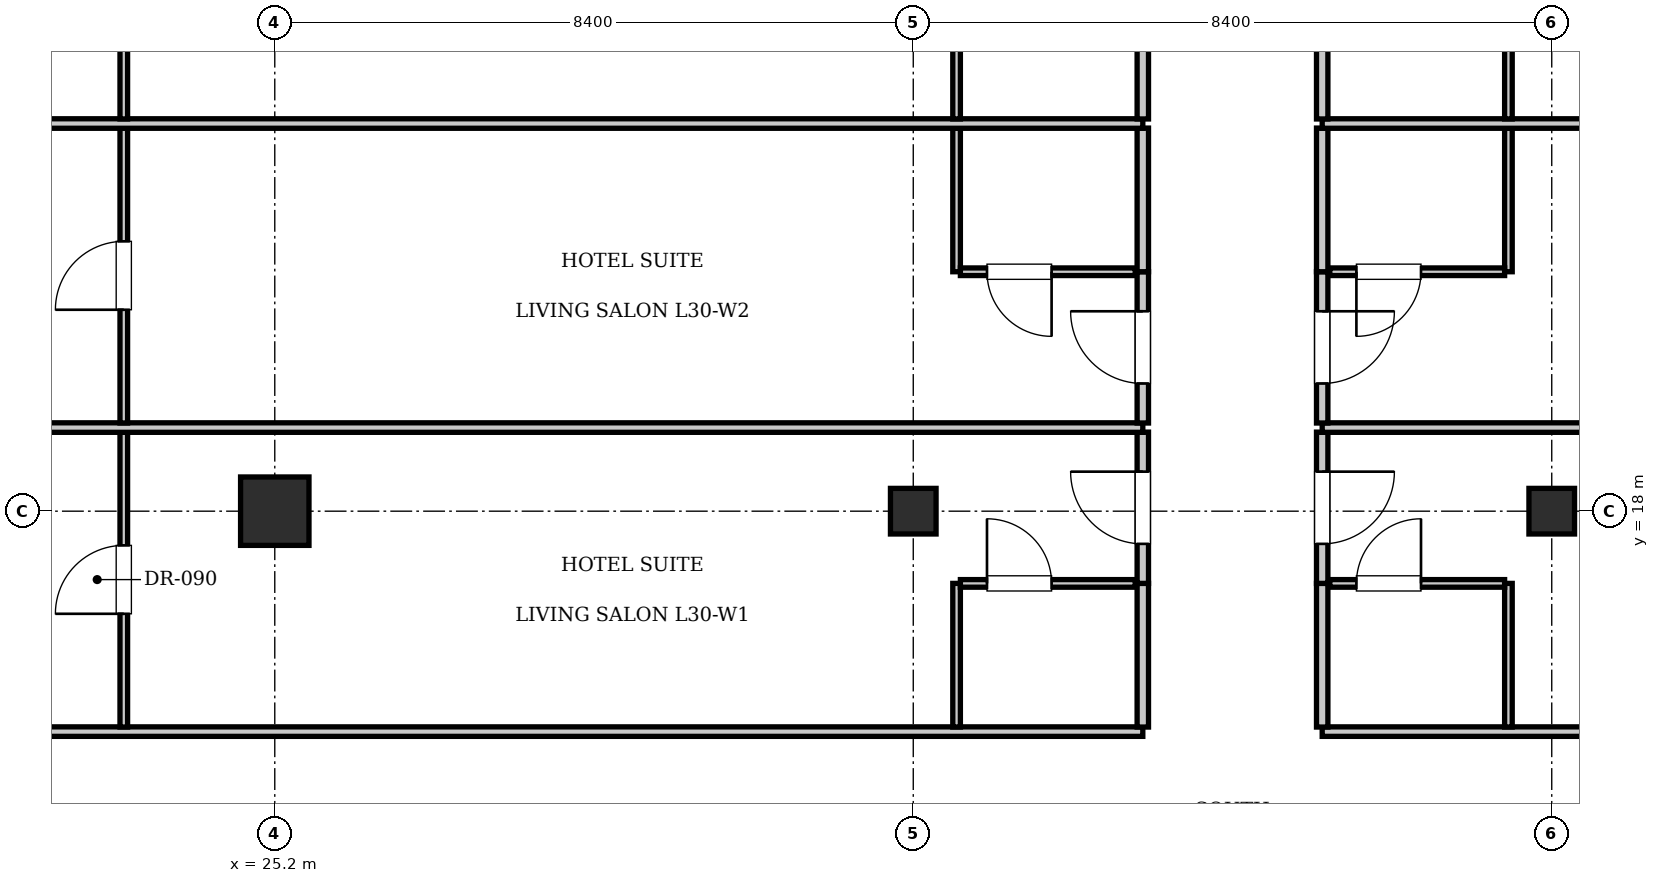
"""IFC4 building model, lengths in metres.
Left out: names, types, materials, properties, quantities, classifications, styles, units other than length and angle.
Written with IfcOpenShell. Run it as: python <this file> out.ifc"""

import sys

from ifc_helpers import new_model, si_unit, direction, frame, frame_2d, origin, origin_2d, place, context, subcontext, project, spatial, rectangle, i_section, extrude, element, fill, save


model = new_model("IFC4")
c1 = context("Model", 3, precision=1e-05, world=origin(), true_north=direction((0.0, 1.0)))
c2 = subcontext(c1, "Body", "Model", "MODEL_VIEW")
j1 = project(units=[si_unit("LENGTHUNIT", "METRE"), si_unit("PLANEANGLEUNIT", "RADIAN")], contexts=[c1])
p1 = place(None, origin())
s1 = spatial("IfcSite", under=j1, at=p1, CompositionType="ELEMENT")
p2 = place(p1, origin())
s2 = spatial("IfcBuilding", under=s1, at=p2, CompositionType="ELEMENT")
p3 = place(p2, frame((0.0, 0.0, 127.4)))
s3 = spatial("IfcBuildingStorey", under=s2, at=p3, CompositionType="ELEMENT", Elevation=127.4)
p4 = place(p3, frame((25.2, 18.0, 0.0), z_axis=(0.0, 0.0, 1.0), x_axis=(1.0, 0.0, 0.0)))
e1 = element("IfcColumn", 1, at=p4, inside=s3, PredefinedType="COLUMN", context=c2, shape_type="SweptSolid", body=[
    extrude(rectangle(XDim=0.9, YDim=0.9, at=origin_2d()), origin(), (0.0, 0.0, 1.0), 3.85),
])
for number, where, z_axis, x_axis in (
    (2, (33.6, 18.0, 0.0), (0.0, 0.0, 1.0), (1.0, 0.0, 0.0)),
    (3, (42.0, 18.0, 0.0), (0.0, 0.0, 1.0), (1.0, 0.0, 0.0)),
):
    element("IfcColumn", number, at=place(p3, frame(where, z_axis=z_axis, x_axis=x_axis)), inside=s3, PredefinedType="COLUMN", context=c2, shape_type="SweptSolid", body=[
        extrude(i_section(OverallWidth=0.6, OverallDepth=0.6, WebThickness=0.025, FlangeThickness=0.038, at=origin_2d()), origin(), (0.0, 0.0, 1.0), 3.85),
    ])
p5 = place(p3, frame((13.2, 15.1, 0.0), z_axis=(0.0, 0.0, 1.0), x_axis=(1.0, 0.0, 0.0)))
e4 = element("IfcWall", 4, at=p5, inside=s3, PredefinedType="PARTITIONING", context=c2, shape_type="SweptSolid", body=[
    extrude(rectangle(XDim=23.42, YDim=0.125, at=frame_2d((11.71, 0.0))), origin(), (0.0, 0.0, 1.0), 3.61),
])
p6 = place(p3, frame((38.98, 15.1, 0.0), z_axis=(0.0, 0.0, 1.0), x_axis=(1.0, 0.0, 0.0)))
e5 = element("IfcWall", 5, at=p6, inside=s3, PredefinedType="PARTITIONING", context=c2, shape_type="SweptSolid", body=[
    extrude(rectangle(XDim=23.42, YDim=0.125, at=frame_2d((11.71, 0.0))), origin(), (0.0, 0.0, 1.0), 3.61),
])
p7 = place(p3, frame((36.62, 15.16, 0.0), z_axis=(0.0, 0.0, 1.0), x_axis=(0.0, 1.0, 0.0)))
e6 = element("IfcWall", 6, at=p7, inside=s3, PredefinedType="PARTITIONING", context=c2, shape_type="SweptSolid", body=[
    extrude(rectangle(XDim=1.89, YDim=0.15, at=frame_2d((0.945, 0.0))), origin(), (0.0, 0.0, 1.0), 3.61),
])
p8 = place(p3, frame((36.62, 17.05, 0.0), z_axis=(0.0, 0.0, 1.0), x_axis=(0.0, 1.0, 0.0)))
e7 = element("IfcWall", 7, at=p8, inside=s3, PredefinedType="PARTITIONING", context=c2, shape_type="SweptSolid", body=[
    extrude(rectangle(XDim=1.99, YDim=0.15, at=frame_2d((0.995, 0.0))), origin(), (0.0, 0.0, 1.0), 3.61),
])
p9 = place(p8, frame((0.52, 0.0, 0.0)))
e8 = element("IfcOpeningElement", 8, at=p9, cuts=e7, PredefinedType="OPENING", context=c2, shape_type="SweptSolid", body=[
    extrude(rectangle(XDim=0.95, YDim=2.15, at=frame_2d((0.475, 1.075))), frame((0.0, 0.085, 0.0), z_axis=(0.0, -1.0, 0.0), x_axis=(1.0, 0.0, 0.0)), (0.0, 0.0, 1.0), 0.17),
])
p10 = place(p3, frame((34.17, 15.16, 0.0), z_axis=(0.0, 0.0, 1.0), x_axis=(0.0, 1.0, 0.0)))
e9 = element("IfcWall", 9, at=p10, inside=s3, PredefinedType="PARTITIONING", context=c2, shape_type="SweptSolid", body=[
    extrude(rectangle(XDim=1.89, YDim=0.1, at=frame_2d((0.945, 0.0))), origin(), (0.0, 0.0, 1.0), 3.61),
])
p11 = place(p3, frame((34.22, 17.05, 0.0), z_axis=(0.0, 0.0, 1.0), x_axis=(1.0, 0.0, 0.0)))
e10 = element("IfcWall", 10, at=p11, inside=s3, PredefinedType="PARTITIONING", context=c2, shape_type="SweptSolid", body=[
    extrude(rectangle(XDim=2.3, YDim=0.1, at=frame_2d((1.15, 0.0))), origin(), (0.0, 0.0, 1.0), 3.61),
])
p12 = place(p11, frame((0.35, 0.0, 0.0)))
e11 = element("IfcOpeningElement", 11, at=p12, cuts=e10, PredefinedType="OPENING", context=c2, shape_type="SweptSolid", body=[
    extrude(rectangle(XDim=0.85, YDim=2.1, at=frame_2d((0.425, 1.05))), frame((0.0, 0.06, 0.0), z_axis=(0.0, -1.0, 0.0), x_axis=(1.0, 0.0, 0.0)), (0.0, 0.0, 1.0), 0.12),
])
p13 = place(p3, frame((23.214, 15.16, 0.0), z_axis=(0.0, 0.0, 1.0), x_axis=(0.0, 1.0, 0.0)))
e12 = element("IfcWall", 12, at=p13, inside=s3, PredefinedType="PARTITIONING", context=c2, shape_type="SweptSolid", body=[
    extrude(rectangle(XDim=3.88, YDim=0.1, at=frame_2d((1.94, 0.0))), origin(), (0.0, 0.0, 1.0), 3.61),
])
p14 = place(p13, frame((1.49, 0.0, 0.0)))
e13 = element("IfcOpeningElement", 13, at=p14, cuts=e12, PredefinedType="OPENING", context=c2, shape_type="SweptSolid", body=[
    extrude(rectangle(XDim=0.9, YDim=2.1, at=frame_2d((0.45, 1.05))), frame((0.0, 0.06, 0.0), z_axis=(0.0, -1.0, 0.0), x_axis=(1.0, 0.0, 0.0)), (0.0, 0.0, 1.0), 0.12),
])
p15 = place(p3, frame((38.98, 15.16, 0.0), z_axis=(0.0, 0.0, 1.0), x_axis=(0.0, 1.0, 0.0)))
e14 = element("IfcWall", 14, at=p15, inside=s3, PredefinedType="PARTITIONING", context=c2, shape_type="SweptSolid", body=[
    extrude(rectangle(XDim=1.89, YDim=0.15, at=frame_2d((0.945, 0.0))), origin(), (0.0, 0.0, 1.0), 3.61),
])
p16 = place(p3, frame((38.98, 17.05, 0.0), z_axis=(0.0, 0.0, 1.0), x_axis=(0.0, 1.0, 0.0)))
e15 = element("IfcWall", 15, at=p16, inside=s3, PredefinedType="PARTITIONING", context=c2, shape_type="SweptSolid", body=[
    extrude(rectangle(XDim=1.99, YDim=0.15, at=frame_2d((0.995, 0.0))), origin(), (0.0, 0.0, 1.0), 3.61),
])
p17 = place(p16, frame((0.52, 0.0, 0.0)))
e16 = element("IfcOpeningElement", 16, at=p17, cuts=e15, PredefinedType="OPENING", context=c2, shape_type="SweptSolid", body=[
    extrude(rectangle(XDim=0.95, YDim=2.15, at=frame_2d((0.475, 1.075))), frame((0.0, 0.085, 0.0), z_axis=(0.0, -1.0, 0.0), x_axis=(1.0, 0.0, 0.0)), (0.0, 0.0, 1.0), 0.17),
])
p18 = place(p3, frame((41.43, 15.16, 0.0), z_axis=(0.0, 0.0, 1.0), x_axis=(0.0, 1.0, 0.0)))
e17 = element("IfcWall", 17, at=p18, inside=s3, PredefinedType="PARTITIONING", context=c2, shape_type="SweptSolid", body=[
    extrude(rectangle(XDim=1.89, YDim=0.1, at=frame_2d((0.945, 0.0))), origin(), (0.0, 0.0, 1.0), 3.61),
])
p19 = place(p3, frame((39.08, 17.05, 0.0), z_axis=(0.0, 0.0, 1.0), x_axis=(1.0, 0.0, 0.0)))
e18 = element("IfcWall", 18, at=p19, inside=s3, PredefinedType="PARTITIONING", context=c2, shape_type="SweptSolid", body=[
    extrude(rectangle(XDim=2.3, YDim=0.1, at=frame_2d((1.15, 0.0))), origin(), (0.0, 0.0, 1.0), 3.61),
])
p20 = place(p19, frame((0.35, 0.0, 0.0)))
e19 = element("IfcOpeningElement", 19, at=p20, cuts=e18, PredefinedType="OPENING", context=c2, shape_type="SweptSolid", body=[
    extrude(rectangle(XDim=0.85, YDim=2.1, at=frame_2d((0.425, 1.05))), frame((0.0, 0.06, 0.0), z_axis=(0.0, -1.0, 0.0), x_axis=(1.0, 0.0, 0.0)), (0.0, 0.0, 1.0), 0.12),
])
p21 = place(p3, frame((13.2, 19.1, 0.0), z_axis=(0.0, 0.0, 1.0), x_axis=(1.0, 0.0, 0.0)))
e20 = element("IfcWall", 20, at=p21, inside=s3, PredefinedType="PARTITIONING", context=c2, shape_type="SweptSolid", body=[
    extrude(rectangle(XDim=23.42, YDim=0.125, at=frame_2d((11.71, 0.0))), origin(), (0.0, 0.0, 1.0), 3.61),
])
p22 = place(p3, frame((38.98, 19.1, 0.0), z_axis=(0.0, 0.0, 1.0), x_axis=(1.0, 0.0, 0.0)))
e21 = element("IfcWall", 21, at=p22, inside=s3, PredefinedType="PARTITIONING", context=c2, shape_type="SweptSolid", body=[
    extrude(rectangle(XDim=23.42, YDim=0.125, at=frame_2d((11.71, 0.0))), origin(), (0.0, 0.0, 1.0), 3.61),
])
p23 = place(p3, frame((36.62, 19.16, 0.0), z_axis=(0.0, 0.0, 1.0), x_axis=(0.0, 1.0, 0.0)))
e22 = element("IfcWall", 22, at=p23, inside=s3, PredefinedType="PARTITIONING", context=c2, shape_type="SweptSolid", body=[
    extrude(rectangle(XDim=1.99, YDim=0.15, at=frame_2d((0.995, 0.0))), origin(), (0.0, 0.0, 1.0), 3.61),
])
p24 = place(p23, frame((0.52, 0.0, 0.0)))
e23 = element("IfcOpeningElement", 23, at=p24, cuts=e22, PredefinedType="OPENING", context=c2, shape_type="SweptSolid", body=[
    extrude(rectangle(XDim=0.95, YDim=2.15, at=frame_2d((0.475, 1.075))), frame((0.0, 0.085, 0.0), z_axis=(0.0, -1.0, 0.0), x_axis=(1.0, 0.0, 0.0)), (0.0, 0.0, 1.0), 0.17),
])
p25 = place(p3, frame((36.62, 21.15, 0.0), z_axis=(0.0, 0.0, 1.0), x_axis=(0.0, 1.0, 0.0)))
e24 = element("IfcWall", 24, at=p25, inside=s3, PredefinedType="PARTITIONING", context=c2, shape_type="SweptSolid", body=[
    extrude(rectangle(XDim=1.89, YDim=0.15, at=frame_2d((0.945, 0.0))), origin(), (0.0, 0.0, 1.0), 3.61),
])
p26 = place(p3, frame((34.17, 21.15, 0.0), z_axis=(0.0, 0.0, 1.0), x_axis=(0.0, 1.0, 0.0)))
e25 = element("IfcWall", 25, at=p26, inside=s3, PredefinedType="PARTITIONING", context=c2, shape_type="SweptSolid", body=[
    extrude(rectangle(XDim=1.89, YDim=0.1, at=frame_2d((0.945, 0.0))), origin(), (0.0, 0.0, 1.0), 3.61),
])
p27 = place(p3, frame((34.22, 21.15, 0.0), z_axis=(0.0, 0.0, 1.0), x_axis=(1.0, 0.0, 0.0)))
e26 = element("IfcWall", 26, at=p27, inside=s3, PredefinedType="PARTITIONING", context=c2, shape_type="SweptSolid", body=[
    extrude(rectangle(XDim=2.3, YDim=0.1, at=frame_2d((1.15, 0.0))), origin(), (0.0, 0.0, 1.0), 3.61),
])
p28 = place(p27, frame((0.35, 0.0, 0.0)))
e27 = element("IfcOpeningElement", 27, at=p28, cuts=e26, PredefinedType="OPENING", context=c2, shape_type="SweptSolid", body=[
    extrude(rectangle(XDim=0.85, YDim=2.1, at=frame_2d((0.425, 1.05))), frame((0.0, 0.06, 0.0), z_axis=(0.0, -1.0, 0.0), x_axis=(1.0, 0.0, 0.0)), (0.0, 0.0, 1.0), 0.12),
])
p29 = place(p3, frame((23.214, 19.16, 0.0), z_axis=(0.0, 0.0, 1.0), x_axis=(0.0, 1.0, 0.0)))
e28 = element("IfcWall", 28, at=p29, inside=s3, PredefinedType="PARTITIONING", context=c2, shape_type="SweptSolid", body=[
    extrude(rectangle(XDim=3.88, YDim=0.1, at=frame_2d((1.94, 0.0))), origin(), (0.0, 0.0, 1.0), 3.61),
])
p30 = place(p29, frame((1.49, 0.0, 0.0)))
e29 = element("IfcOpeningElement", 29, at=p30, cuts=e28, PredefinedType="OPENING", context=c2, shape_type="SweptSolid", body=[
    extrude(rectangle(XDim=0.9, YDim=2.1, at=frame_2d((0.45, 1.05))), frame((0.0, 0.06, 0.0), z_axis=(0.0, -1.0, 0.0), x_axis=(1.0, 0.0, 0.0)), (0.0, 0.0, 1.0), 0.12),
])
p31 = place(p3, frame((38.98, 19.16, 0.0), z_axis=(0.0, 0.0, 1.0), x_axis=(0.0, 1.0, 0.0)))
e30 = element("IfcWall", 30, at=p31, inside=s3, PredefinedType="PARTITIONING", context=c2, shape_type="SweptSolid", body=[
    extrude(rectangle(XDim=1.99, YDim=0.15, at=frame_2d((0.995, 0.0))), origin(), (0.0, 0.0, 1.0), 3.61),
])
p32 = place(p31, frame((0.52, 0.0, 0.0)))
e31 = element("IfcOpeningElement", 31, at=p32, cuts=e30, PredefinedType="OPENING", context=c2, shape_type="SweptSolid", body=[
    extrude(rectangle(XDim=0.95, YDim=2.15, at=frame_2d((0.475, 1.075))), frame((0.0, 0.085, 0.0), z_axis=(0.0, -1.0, 0.0), x_axis=(1.0, 0.0, 0.0)), (0.0, 0.0, 1.0), 0.17),
])
p33 = place(p3, frame((38.98, 21.15, 0.0), z_axis=(0.0, 0.0, 1.0), x_axis=(0.0, 1.0, 0.0)))
e32 = element("IfcWall", 32, at=p33, inside=s3, PredefinedType="PARTITIONING", context=c2, shape_type="SweptSolid", body=[
    extrude(rectangle(XDim=1.89, YDim=0.15, at=frame_2d((0.945, 0.0))), origin(), (0.0, 0.0, 1.0), 3.61),
])
p34 = place(p3, frame((41.43, 21.15, 0.0), z_axis=(0.0, 0.0, 1.0), x_axis=(0.0, 1.0, 0.0)))
e33 = element("IfcWall", 33, at=p34, inside=s3, PredefinedType="PARTITIONING", context=c2, shape_type="SweptSolid", body=[
    extrude(rectangle(XDim=1.89, YDim=0.1, at=frame_2d((0.945, 0.0))), origin(), (0.0, 0.0, 1.0), 3.61),
])
p35 = place(p3, frame((39.08, 21.15, 0.0), z_axis=(0.0, 0.0, 1.0), x_axis=(1.0, 0.0, 0.0)))
e34 = element("IfcWall", 34, at=p35, inside=s3, PredefinedType="PARTITIONING", context=c2, shape_type="SweptSolid", body=[
    extrude(rectangle(XDim=2.3, YDim=0.1, at=frame_2d((1.15, 0.0))), origin(), (0.0, 0.0, 1.0), 3.61),
])
p36 = place(p35, frame((0.35, 0.0, 0.0)))
e35 = element("IfcOpeningElement", 35, at=p36, cuts=e34, PredefinedType="OPENING", context=c2, shape_type="SweptSolid", body=[
    extrude(rectangle(XDim=0.85, YDim=2.1, at=frame_2d((0.425, 1.05))), frame((0.0, 0.06, 0.0), z_axis=(0.0, -1.0, 0.0), x_axis=(1.0, 0.0, 0.0)), (0.0, 0.0, 1.0), 0.12),
])
p37 = place(p3, frame((13.2, 23.1, 0.0), z_axis=(0.0, 0.0, 1.0), x_axis=(1.0, 0.0, 0.0)))
e36 = element("IfcWall", 36, at=p37, inside=s3, PredefinedType="PARTITIONING", context=c2, shape_type="SweptSolid", body=[
    extrude(rectangle(XDim=23.42, YDim=0.125, at=frame_2d((11.71, 0.0))), origin(), (0.0, 0.0, 1.0), 3.61),
])
p38 = place(p3, frame((38.98, 23.1, 0.0), z_axis=(0.0, 0.0, 1.0), x_axis=(1.0, 0.0, 0.0)))
e37 = element("IfcWall", 37, at=p38, inside=s3, PredefinedType="PARTITIONING", context=c2, shape_type="SweptSolid", body=[
    extrude(rectangle(XDim=23.42, YDim=0.125, at=frame_2d((11.71, 0.0))), origin(), (0.0, 0.0, 1.0), 3.61),
])
p39 = place(p3, frame((36.62, 23.16, 0.0), z_axis=(0.0, 0.0, 1.0), x_axis=(0.0, 1.0, 0.0)))
e38 = element("IfcWall", 38, at=p39, inside=s3, PredefinedType="PARTITIONING", context=c2, shape_type="SweptSolid", body=[
    extrude(rectangle(XDim=1.89, YDim=0.15, at=frame_2d((0.945, 0.0))), origin(), (0.0, 0.0, 1.0), 3.61),
])
p40 = place(p3, frame((34.17, 23.16, 0.0), z_axis=(0.0, 0.0, 1.0), x_axis=(0.0, 1.0, 0.0)))
e39 = element("IfcWall", 39, at=p40, inside=s3, PredefinedType="PARTITIONING", context=c2, shape_type="SweptSolid", body=[
    extrude(rectangle(XDim=1.89, YDim=0.1, at=frame_2d((0.945, 0.0))), origin(), (0.0, 0.0, 1.0), 3.61),
])
p41 = place(p3, frame((23.214, 23.16, 0.0), z_axis=(0.0, 0.0, 1.0), x_axis=(0.0, 1.0, 0.0)))
e40 = element("IfcWall", 40, at=p41, inside=s3, PredefinedType="PARTITIONING", context=c2, shape_type="SweptSolid", body=[
    extrude(rectangle(XDim=3.88, YDim=0.1, at=frame_2d((1.94, 0.0))), origin(), (0.0, 0.0, 1.0), 3.61),
])
p42 = place(p41, frame((1.49, 0.0, 0.0)))
e41 = element("IfcOpeningElement", 41, at=p42, cuts=e40, PredefinedType="OPENING", context=c2, shape_type="SweptSolid", body=[
    extrude(rectangle(XDim=0.9, YDim=2.1, at=frame_2d((0.45, 1.05))), frame((0.0, 0.06, 0.0), z_axis=(0.0, -1.0, 0.0), x_axis=(1.0, 0.0, 0.0)), (0.0, 0.0, 1.0), 0.12),
])
p43 = place(p3, frame((38.98, 23.16, 0.0), z_axis=(0.0, 0.0, 1.0), x_axis=(0.0, 1.0, 0.0)))
e42 = element("IfcWall", 42, at=p43, inside=s3, PredefinedType="PARTITIONING", context=c2, shape_type="SweptSolid", body=[
    extrude(rectangle(XDim=1.89, YDim=0.15, at=frame_2d((0.945, 0.0))), origin(), (0.0, 0.0, 1.0), 3.61),
])
p44 = place(p3, frame((41.43, 23.16, 0.0), z_axis=(0.0, 0.0, 1.0), x_axis=(0.0, 1.0, 0.0)))
e43 = element("IfcWall", 43, at=p44, inside=s3, PredefinedType="PARTITIONING", context=c2, shape_type="SweptSolid", body=[
    extrude(rectangle(XDim=1.89, YDim=0.1, at=frame_2d((0.945, 0.0))), origin(), (0.0, 0.0, 1.0), 3.61),
])
p45 = place(p12, origin())
e44 = element("IfcDoor", 44, at=p45, inside=s3, OperationType="SINGLE_SWING_LEFT", PredefinedType="DOOR", context=c2, shape_type="SweptSolid", body=[
    extrude(rectangle(XDim=0.85, YDim=2.1, at=frame_2d((0.425, 1.05))), frame((0.0, 0.025, 0.0), z_axis=(0.0, -1.0, 0.0), x_axis=(1.0, 0.0, 0.0)), (0.0, 0.0, 1.0), 0.05),
])
fill(e11, e44)
p46 = place(p9, origin())
e45 = element("IfcDoor", 45, at=p46, inside=s3, OperationType="SINGLE_SWING_RIGHT", PredefinedType="DOOR", context=c2, shape_type="SweptSolid", body=[
    extrude(rectangle(XDim=0.95, YDim=2.15, at=frame_2d((0.475, 1.075))), frame((0.0, 0.025, 0.0), z_axis=(0.0, -1.0, 0.0), x_axis=(1.0, 0.0, 0.0)), (0.0, 0.0, 1.0), 0.05),
])
fill(e8, e45)
p47 = place(p14, origin())
e46 = element("IfcDoor", 46, at=p47, inside=s3, OperationType="SINGLE_SWING_LEFT", PredefinedType="DOOR", context=c2, shape_type="SweptSolid", body=[
    extrude(rectangle(XDim=0.9, YDim=2.1, at=frame_2d((0.45, 1.05))), frame((0.0, 0.025, 0.0), z_axis=(0.0, -1.0, 0.0), x_axis=(1.0, 0.0, 0.0)), (0.0, 0.0, 1.0), 0.05),
])
fill(e13, e46)
p48 = place(p20, origin())
e47 = element("IfcDoor", 47, at=p48, inside=s3, OperationType="SINGLE_SWING_RIGHT", PredefinedType="DOOR", context=c2, shape_type="SweptSolid", body=[
    extrude(rectangle(XDim=0.85, YDim=2.1, at=frame_2d((0.425, 1.05))), frame((0.0, 0.025, 0.0), z_axis=(0.0, -1.0, 0.0), x_axis=(1.0, 0.0, 0.0)), (0.0, 0.0, 1.0), 0.05),
])
fill(e19, e47)
p49 = place(p17, frame((0.95, 0.0, 0.0), z_axis=(0.0, 0.0, 1.0), x_axis=(-1.0, 0.0, 0.0)))
e48 = element("IfcDoor", 48, at=p49, inside=s3, OperationType="SINGLE_SWING_LEFT", PredefinedType="DOOR", context=c2, shape_type="SweptSolid", body=[
    extrude(rectangle(XDim=0.95, YDim=2.15, at=frame_2d((0.475, 1.075))), frame((0.0, 0.025, 0.0), z_axis=(0.0, -1.0, 0.0), x_axis=(1.0, 0.0, 0.0)), (0.0, 0.0, 1.0), 0.05),
])
fill(e16, e48)
p50 = place(p28, frame((0.85, 0.0, 0.0), z_axis=(0.0, 0.0, 1.0), x_axis=(-1.0, 0.0, 0.0)))
e49 = element("IfcDoor", 49, at=p50, inside=s3, OperationType="SINGLE_SWING_LEFT", PredefinedType="DOOR", context=c2, shape_type="SweptSolid", body=[
    extrude(rectangle(XDim=0.85, YDim=2.1, at=frame_2d((0.425, 1.05))), frame((0.0, 0.025, 0.0), z_axis=(0.0, -1.0, 0.0), x_axis=(1.0, 0.0, 0.0)), (0.0, 0.0, 1.0), 0.05),
])
fill(e27, e49)
p51 = place(p24, origin())
e50 = element("IfcDoor", 50, at=p51, inside=s3, OperationType="SINGLE_SWING_RIGHT", PredefinedType="DOOR", context=c2, shape_type="SweptSolid", body=[
    extrude(rectangle(XDim=0.95, YDim=2.15, at=frame_2d((0.475, 1.075))), frame((0.0, 0.025, 0.0), z_axis=(0.0, -1.0, 0.0), x_axis=(1.0, 0.0, 0.0)), (0.0, 0.0, 1.0), 0.05),
])
fill(e23, e50)
p52 = place(p30, origin())
e51 = element("IfcDoor", 51, at=p52, inside=s3, OperationType="SINGLE_SWING_LEFT", PredefinedType="DOOR", context=c2, shape_type="SweptSolid", body=[
    extrude(rectangle(XDim=0.9, YDim=2.1, at=frame_2d((0.45, 1.05))), frame((0.0, 0.025, 0.0), z_axis=(0.0, -1.0, 0.0), x_axis=(1.0, 0.0, 0.0)), (0.0, 0.0, 1.0), 0.05),
])
fill(e29, e51)
p53 = place(p36, frame((0.85, 0.0, 0.0), z_axis=(0.0, 0.0, 1.0), x_axis=(-1.0, 0.0, 0.0)))
e52 = element("IfcDoor", 52, at=p53, inside=s3, OperationType="SINGLE_SWING_RIGHT", PredefinedType="DOOR", context=c2, shape_type="SweptSolid", body=[
    extrude(rectangle(XDim=0.85, YDim=2.1, at=frame_2d((0.425, 1.05))), frame((0.0, 0.025, 0.0), z_axis=(0.0, -1.0, 0.0), x_axis=(1.0, 0.0, 0.0)), (0.0, 0.0, 1.0), 0.05),
])
fill(e35, e52)
p54 = place(p32, frame((0.95, 0.0, 0.0), z_axis=(0.0, 0.0, 1.0), x_axis=(-1.0, 0.0, 0.0)))
e53 = element("IfcDoor", 53, at=p54, inside=s3, OperationType="SINGLE_SWING_LEFT", PredefinedType="DOOR", context=c2, shape_type="SweptSolid", body=[
    extrude(rectangle(XDim=0.95, YDim=2.15, at=frame_2d((0.475, 1.075))), frame((0.0, 0.025, 0.0), z_axis=(0.0, -1.0, 0.0), x_axis=(1.0, 0.0, 0.0)), (0.0, 0.0, 1.0), 0.05),
])
fill(e31, e53)
save(model, sys.argv[1])
